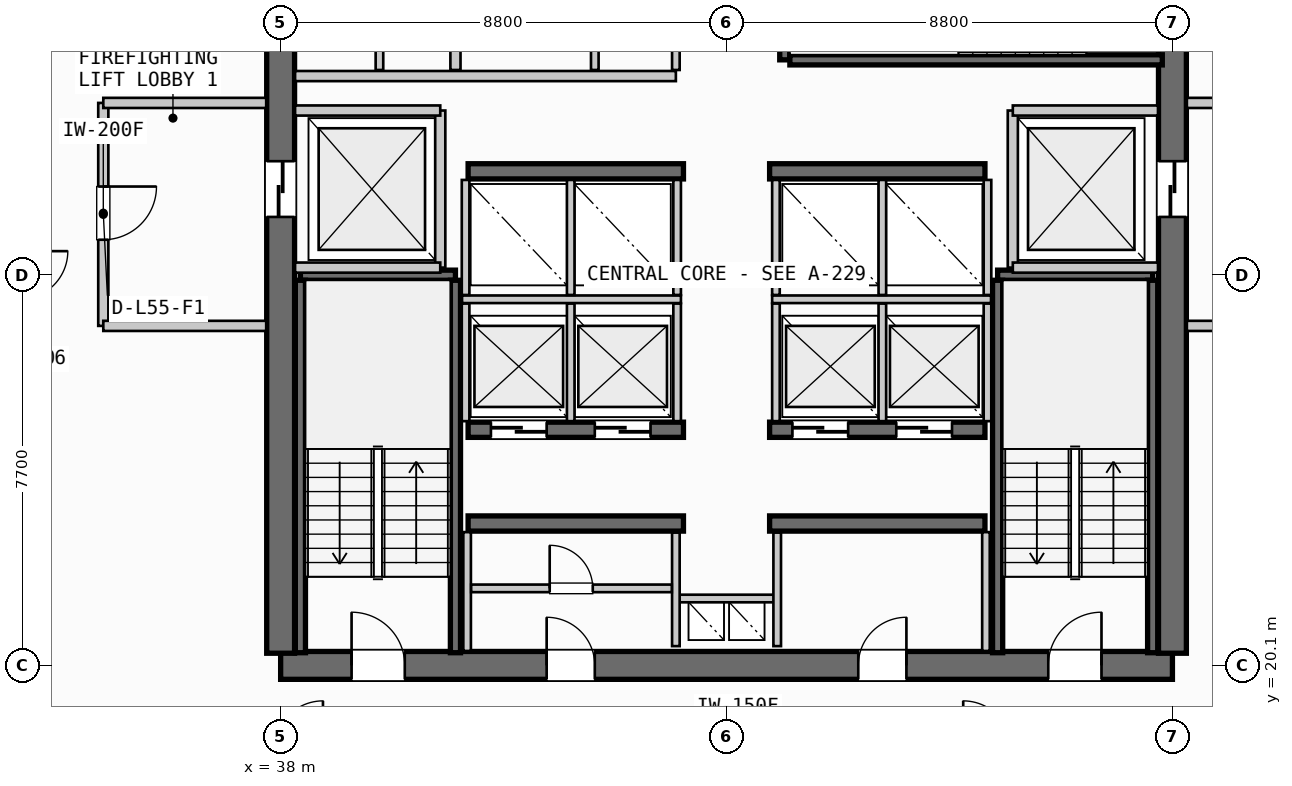
"""IFC4 building model, lengths in metres.
Left out: names, types, materials, properties, quantities, classifications, styles, units other than length and angle.
Written with IfcOpenShell. Run it as: python <this file> out.ifc"""

import sys

from ifc_helpers import new_model, si_unit, direction, frame, frame_2d, origin, place, context, subcontext, project, spatial, rectangle, extrude, source, transform, mapped, element, fill, save


model = new_model("IFC4")
c1 = context("Model", 3, precision=1e-05, world=origin(), true_north=direction((0.0, 1.0)))
c2 = subcontext(c1, "Body", "Model", "MODEL_VIEW")
j1 = project(units=[si_unit("LENGTHUNIT", "METRE"), si_unit("PLANEANGLEUNIT", "RADIAN")], contexts=[c1])
p1 = place(None, origin())
s1 = spatial("IfcSite", under=j1, at=p1, CompositionType="ELEMENT")
p2 = place(p1, origin())
s2 = spatial("IfcBuilding", under=s1, at=p2, CompositionType="ELEMENT")
p3 = place(p2, frame((0.0, 0.0, 211.4)))
s3 = spatial("IfcBuildingStorey", under=s2, at=p3, CompositionType="ELEMENT", Elevation=211.4)
p4 = place(p3, frame((38.0, 20.1, 0.0), z_axis=(0.0, 0.0, 1.0), x_axis=(1.0, 0.0, 0.0)))
e1 = element("IfcWall", 1, at=p4, inside=s3, PredefinedType="SHEAR", context=c2, shape_type="SweptSolid", body=[
    extrude(rectangle(XDim=17.6, YDim=0.55, at=frame_2d((8.8, 0.0))), origin(), (0.0, 0.0, 1.0), 3.26),
])
p5 = place(p4, frame((1.4, 0.0, 0.0)))
e2 = element("IfcOpeningElement", 2, at=p5, cuts=e1, PredefinedType="OPENING", context=c2, shape_type="SweptSolid", body=[
    extrude(rectangle(XDim=1.05, YDim=2.15, at=frame_2d((0.525, 1.075))), frame((0.0, 0.285, 0.0), z_axis=(0.0, -1.0, 0.0), x_axis=(1.0, 0.0, 0.0)), (0.0, 0.0, 1.0), 0.57),
])
p6 = place(p4, frame((15.15, 0.0, 0.0)))
e3 = element("IfcOpeningElement", 3, at=p6, cuts=e1, PredefinedType="OPENING", context=c2, shape_type="SweptSolid", body=[
    extrude(rectangle(XDim=1.05, YDim=2.15, at=frame_2d((0.525, 1.075))), frame((0.0, 0.285, 0.0), z_axis=(0.0, -1.0, 0.0), x_axis=(1.0, 0.0, 0.0)), (0.0, 0.0, 1.0), 0.57),
])
p7 = place(p4, frame((5.25, 0.0, 0.0)))
e4 = element("IfcOpeningElement", 4, at=p7, cuts=e1, PredefinedType="OPENING", context=c2, shape_type="SweptSolid", body=[
    extrude(rectangle(XDim=0.95, YDim=2.15, at=frame_2d((0.475, 1.075))), frame((0.0, 0.285, 0.0), z_axis=(0.0, -1.0, 0.0), x_axis=(1.0, 0.0, 0.0)), (0.0, 0.0, 1.0), 0.57),
])
p8 = place(p4, frame((11.4, 0.0, 0.0)))
e5 = element("IfcOpeningElement", 5, at=p8, cuts=e1, PredefinedType="OPENING", context=c2, shape_type="SweptSolid", body=[
    extrude(rectangle(XDim=0.95, YDim=2.15, at=frame_2d((0.475, 1.075))), frame((0.0, 0.285, 0.0), z_axis=(0.0, -1.0, 0.0), x_axis=(1.0, 0.0, 0.0)), (0.0, 0.0, 1.0), 0.57),
])
p9 = place(p3, frame((38.0, 35.26, 0.0), z_axis=(0.0, 0.0, 1.0), x_axis=(0.0, -1.0, 0.0)))
e6 = element("IfcWall", 6, at=p9, inside=s3, PredefinedType="SHEAR", context=c2, shape_type="SweptSolid", body=[
    extrude(rectangle(XDim=14.92, YDim=0.55, at=frame_2d((7.46, 0.0))), origin(), (0.0, 0.0, 1.0), 3.26),
])
p10 = place(p9, frame((5.21, 0.0, 0.0)))
e7 = element("IfcOpeningElement", 7, at=p10, cuts=e6, PredefinedType="OPENING", context=c2, shape_type="SweptSolid", body=[
    extrude(rectangle(XDim=1.1, YDim=2.2, at=frame_2d((0.55, 1.1))), frame((0.0, 0.285, 0.0), z_axis=(0.0, -1.0, 0.0), x_axis=(1.0, 0.0, 0.0)), (0.0, 0.0, 1.0), 0.57),
])
p11 = place(p3, frame((55.6, 20.34, 0.0), z_axis=(0.0, 0.0, 1.0), x_axis=(0.0, 1.0, 0.0)))
e8 = element("IfcWall", 8, at=p11, inside=s3, PredefinedType="SHEAR", context=c2, shape_type="SweptSolid", body=[
    extrude(rectangle(XDim=14.92, YDim=0.55, at=frame_2d((7.46, 0.0))), origin(), (0.0, 0.0, 1.0), 3.26),
])
p12 = place(p11, frame((12.71, 0.0, 0.0)))
e9 = element("IfcOpeningElement", 9, at=p12, cuts=e8, PredefinedType="OPENING", context=c2, shape_type="SweptSolid", body=[
    extrude(rectangle(XDim=1.05, YDim=2.15, at=frame_2d((0.525, 1.075))), frame((0.0, 0.285, 0.0), z_axis=(0.0, -1.0, 0.0), x_axis=(1.0, 0.0, 0.0)), (0.0, 0.0, 1.0), 0.57),
])
p13 = place(p11, frame((8.61, 0.0, 0.0)))
e10 = element("IfcOpeningElement", 10, at=p13, cuts=e8, PredefinedType="OPENING", context=c2, shape_type="SweptSolid", body=[
    extrude(rectangle(XDim=1.1, YDim=2.2, at=frame_2d((0.55, 1.1))), frame((0.0, 0.285, 0.0), z_axis=(0.0, -1.0, 0.0), x_axis=(1.0, 0.0, 0.0)), (0.0, 0.0, 1.0), 0.57),
])
for number, where, z_axis, x_axis in (
    (11, (41.7, 22.9, 0.0), (0.0, 0.0, 1.0), (1.0, 0.0, 0.0)),
    (12, (47.65, 22.9, 0.0), (0.0, 0.0, 1.0), (1.0, 0.0, 0.0)),
):
    element("IfcWall", number, at=place(p3, frame(where, z_axis=z_axis, x_axis=x_axis)), inside=s3, PredefinedType="SHEAR", context=c2, shape_type="SweptSolid", body=[
        extrude(rectangle(XDim=4.25, YDim=0.3, at=frame_2d((2.125, 0.0))), origin(), (0.0, 0.0, 1.0), 3.26),
    ])
p14 = place(p3, frame((41.7, 24.75, 0.0), z_axis=(0.0, 0.0, 1.0), x_axis=(1.0, 0.0, 0.0)))
e13 = element("IfcWall", 13, at=p14, inside=s3, PredefinedType="SHEAR", context=c2, shape_type="SweptSolid", body=[
    extrude(rectangle(XDim=4.25, YDim=0.3, at=frame_2d((2.125, 0.0))), origin(), (0.0, 0.0, 1.0), 3.26),
])
p15 = place(p14, frame((0.45, 0.0, 0.0)))
e14 = element("IfcOpeningElement", 14, at=p15, cuts=e13, PredefinedType="OPENING", context=c2, shape_type="SweptSolid", body=[
    extrude(rectangle(XDim=1.1, YDim=2.2, at=frame_2d((0.55, 1.1))), frame((0.0, 0.16, 0.0), z_axis=(0.0, -1.0, 0.0), x_axis=(1.0, 0.0, 0.0)), (0.0, 0.0, 1.0), 0.32),
])
p16 = place(p14, frame((2.5, 0.0, 0.0)))
e15 = element("IfcOpeningElement", 15, at=p16, cuts=e13, PredefinedType="OPENING", context=c2, shape_type="SweptSolid", body=[
    extrude(rectangle(XDim=1.1, YDim=2.2, at=frame_2d((0.55, 1.1))), frame((0.0, 0.16, 0.0), z_axis=(0.0, -1.0, 0.0), x_axis=(1.0, 0.0, 0.0)), (0.0, 0.0, 1.0), 0.32),
])
p17 = place(p3, frame((47.65, 24.75, 0.0), z_axis=(0.0, 0.0, 1.0), x_axis=(1.0, 0.0, 0.0)))
e16 = element("IfcWall", 16, at=p17, inside=s3, PredefinedType="SHEAR", context=c2, shape_type="SweptSolid", body=[
    extrude(rectangle(XDim=4.25, YDim=0.3, at=frame_2d((2.125, 0.0))), origin(), (0.0, 0.0, 1.0), 3.26),
])
p18 = place(p17, frame((0.45, 0.0, 0.0)))
e17 = element("IfcOpeningElement", 17, at=p18, cuts=e16, PredefinedType="OPENING", context=c2, shape_type="SweptSolid", body=[
    extrude(rectangle(XDim=1.1, YDim=2.2, at=frame_2d((0.55, 1.1))), frame((0.0, 0.16, 0.0), z_axis=(0.0, -1.0, 0.0), x_axis=(1.0, 0.0, 0.0)), (0.0, 0.0, 1.0), 0.32),
])
p19 = place(p17, frame((2.5, 0.0, 0.0)))
e18 = element("IfcOpeningElement", 18, at=p19, cuts=e16, PredefinedType="OPENING", context=c2, shape_type="SweptSolid", body=[
    extrude(rectangle(XDim=1.1, YDim=2.2, at=frame_2d((0.55, 1.1))), frame((0.0, 0.16, 0.0), z_axis=(0.0, -1.0, 0.0), x_axis=(1.0, 0.0, 0.0)), (0.0, 0.0, 1.0), 0.32),
])
for number, where, z_axis, x_axis in (
    (19, (41.7, 29.85, 0.0), (0.0, 0.0, 1.0), (1.0, 0.0, 0.0)),
    (20, (47.65, 29.85, 0.0), (0.0, 0.0, 1.0), (1.0, 0.0, 0.0)),
):
    element("IfcWall", number, at=place(p3, frame(where, z_axis=z_axis, x_axis=x_axis)), inside=s3, PredefinedType="SHEAR", context=c2, shape_type="SweptSolid", body=[
        extrude(rectangle(XDim=4.25, YDim=0.3, at=frame_2d((2.125, 0.0))), origin(), (0.0, 0.0, 1.0), 3.26),
    ])
p20 = place(p3, frame((38.39, 27.8, 0.0), z_axis=(0.0, 0.0, 1.0), x_axis=(1.0, 0.0, 0.0)))
e21 = element("IfcWall", 21, at=p20, inside=s3, PredefinedType="SHEAR", context=c2, shape_type="SweptSolid", body=[
    extrude(rectangle(XDim=3.06, YDim=0.2, at=frame_2d((1.53, 0.0))), origin(), (0.0, 0.0, 1.0), 3.26),
])
for number, where, z_axis, x_axis in (
    (22, (41.45, 27.7, 0.0), (0.0, 0.0, 1.0), (0.0, -1.0, 0.0)),
    (23, (38.39, 20.35, 0.0), (0.0, 0.0, 1.0), (0.0, 1.0, 0.0)),
):
    element("IfcWall", number, at=place(p3, frame(where, z_axis=z_axis, x_axis=x_axis)), inside=s3, PredefinedType="SHEAR", context=c2, shape_type="SweptSolid", body=[
        extrude(rectangle(XDim=7.35, YDim=0.2, at=frame_2d((3.675, 0.0))), origin(), (0.0, 0.0, 1.0), 3.26),
    ])
p21 = place(p3, frame((52.15, 27.8, 0.0), z_axis=(0.0, 0.0, 1.0), x_axis=(1.0, 0.0, 0.0)))
e24 = element("IfcWall", 24, at=p21, inside=s3, PredefinedType="SHEAR", context=c2, shape_type="SweptSolid", body=[
    extrude(rectangle(XDim=3.06, YDim=0.2, at=frame_2d((1.53, 0.0))), origin(), (0.0, 0.0, 1.0), 3.26),
])
for number, where, z_axis, x_axis in (
    (25, (55.21, 27.7, 0.0), (0.0, 0.0, 1.0), (0.0, -1.0, 0.0)),
    (26, (52.15, 20.35, 0.0), (0.0, 0.0, 1.0), (0.0, 1.0, 0.0)),
):
    element("IfcWall", number, at=place(p3, frame(where, z_axis=z_axis, x_axis=x_axis)), inside=s3, PredefinedType="SHEAR", context=c2, shape_type="SweptSolid", body=[
        extrude(rectangle(XDim=7.35, YDim=0.2, at=frame_2d((3.675, 0.0))), origin(), (0.0, 0.0, 1.0), 3.26),
    ])
p22 = place(p3, frame((47.95, 32.05, 0.0), z_axis=(0.0, 0.0, 1.0), x_axis=(0.0, 1.0, 0.0)))
e27 = element("IfcWall", 27, at=p22, inside=s3, PredefinedType="SHEAR", context=c2, shape_type="SweptSolid", body=[
    extrude(rectangle(XDim=3.06, YDim=0.2, at=frame_2d((1.53, 0.0))), origin(), (0.0, 0.0, 1.0), 3.26),
])
p23 = place(p3, frame((55.4, 32.05, 0.0), z_axis=(0.0, 0.0, 1.0), x_axis=(-1.0, 0.0, 0.0)))
e28 = element("IfcWall", 28, at=p23, inside=s3, PredefinedType="SHEAR", context=c2, shape_type="SweptSolid", body=[
    extrude(rectangle(XDim=7.35, YDim=0.2, at=frame_2d((3.675, 0.0))), origin(), (0.0, 0.0, 1.0), 3.26),
])
p24 = place(p3, frame((45.8, 21.42, 0.0), z_axis=(0.0, 0.0, 1.0), x_axis=(1.0, 0.0, 0.0)))
e29 = element("IfcWall", 29, at=p24, inside=s3, PredefinedType="PARTITIONING", context=c2, shape_type="SweptSolid", body=[
    extrude(rectangle(XDim=2.0, YDim=0.15, at=frame_2d((1.0, 0.0))), origin(), (0.0, 0.0, 1.0), 2.455),
])
for number, where, z_axis, x_axis in (
    (30, (45.8, 20.48, 0.0), (0.0, 0.0, 1.0), (0.0, 1.0, 0.0)),
    (31, (47.8, 20.48, 0.0), (0.0, 0.0, 1.0), (0.0, 1.0, 0.0)),
):
    element("IfcWall", number, at=place(p3, frame(where, z_axis=z_axis, x_axis=x_axis)), inside=s3, PredefinedType="PARTITIONING", context=c2, shape_type="SweptSolid", body=[
        extrude(rectangle(XDim=2.24, YDim=0.15, at=frame_2d((1.12, 0.0))), origin(), (0.0, 0.0, 1.0), 2.455),
    ])
p25 = place(p3, frame((41.15, 27.95, 0.0), z_axis=(0.0, 0.0, 1.0), x_axis=(0.0, 1.0, 0.0)))
e32 = element("IfcWall", 32, at=p25, inside=s3, PredefinedType="PARTITIONING", context=c2, shape_type="SweptSolid", body=[
    extrude(rectangle(XDim=3.1, YDim=0.2, at=frame_2d((1.55, 0.0))), origin(), (0.0, 0.0, 1.0), 2.455),
])
for number, where, z_axis, x_axis in (
    (33, (38.285, 27.95, 0.0), (0.0, 0.0, 1.0), (1.0, 0.0, 0.0)),
    (34, (38.285, 31.05, 0.0), (0.0, 0.0, 1.0), (1.0, 0.0, 0.0)),
):
    element("IfcWall", number, at=place(p3, frame(where, z_axis=z_axis, x_axis=x_axis)), inside=s3, PredefinedType="PARTITIONING", context=c2, shape_type="SweptSolid", body=[
        extrude(rectangle(XDim=2.865, YDim=0.2, at=frame_2d((1.433, 0.0))), origin(), (0.0, 0.0, 1.0), 2.455),
    ])
p26 = place(p3, frame((34.5, 31.2, 0.0), z_axis=(0.0, 0.0, 1.0), x_axis=(0.0, -1.0, 0.0)))
e35 = element("IfcWall", 35, at=p26, inside=s3, PredefinedType="PARTITIONING", context=c2, shape_type="SweptSolid", body=[
    extrude(rectangle(XDim=4.4, YDim=0.2, at=frame_2d((2.2, 0.0))), origin(), (0.0, 0.0, 1.0), 2.455),
])
p27 = place(p26, frame((1.65, 0.0, 0.0)))
e36 = element("IfcOpeningElement", 36, at=p27, cuts=e35, PredefinedType="OPENING", context=c2, shape_type="SweptSolid", body=[
    extrude(rectangle(XDim=1.05, YDim=2.15, at=frame_2d((0.525, 1.075))), frame((0.0, 0.11, 0.0), z_axis=(0.0, -1.0, 0.0), x_axis=(1.0, 0.0, 0.0)), (0.0, 0.0, 1.0), 0.22),
])
for number, where, z_axis, x_axis in (
    (37, (34.5, 26.8, 0.0), (0.0, 0.0, 1.0), (1.0, 0.0, 0.0)),
    (38, (34.5, 31.2, 0.0), (0.0, 0.0, 1.0), (1.0, 0.0, 0.0)),
):
    element("IfcWall", number, at=place(p3, frame(where, z_axis=z_axis, x_axis=x_axis)), inside=s3, PredefinedType="PARTITIONING", context=c2, shape_type="SweptSolid", body=[
        extrude(rectangle(XDim=3.215, YDim=0.2, at=frame_2d((1.607, 0.0))), origin(), (0.0, 0.0, 1.0), 2.455),
    ])
p28 = place(p3, frame((52.45, 27.95, 0.0), z_axis=(0.0, 0.0, 1.0), x_axis=(0.0, 1.0, 0.0)))
e39 = element("IfcWall", 39, at=p28, inside=s3, PredefinedType="PARTITIONING", context=c2, shape_type="SweptSolid", body=[
    extrude(rectangle(XDim=3.1, YDim=0.2, at=frame_2d((1.55, 0.0))), origin(), (0.0, 0.0, 1.0), 2.455),
])
for number, where, z_axis, x_axis in (
    (40, (52.45, 27.95, 0.0), (0.0, 0.0, 1.0), (1.0, 0.0, 0.0)),
    (41, (52.45, 31.05, 0.0), (0.0, 0.0, 1.0), (1.0, 0.0, 0.0)),
):
    element("IfcWall", number, at=place(p3, frame(where, z_axis=z_axis, x_axis=x_axis)), inside=s3, PredefinedType="PARTITIONING", context=c2, shape_type="SweptSolid", body=[
        extrude(rectangle(XDim=2.865, YDim=0.2, at=frame_2d((1.433, 0.0))), origin(), (0.0, 0.0, 1.0), 2.455),
    ])
for number, where, z_axis, x_axis in (
    (42, (55.885, 26.8, 0.0), (0.0, 0.0, 1.0), (1.0, 0.0, 0.0)),
    (43, (55.885, 31.2, 0.0), (0.0, 0.0, 1.0), (1.0, 0.0, 0.0)),
):
    element("IfcWall", number, at=place(p3, frame(where, z_axis=z_axis, x_axis=x_axis)), inside=s3, PredefinedType="PARTITIONING", context=c2, shape_type="SweptSolid", body=[
        extrude(rectangle(XDim=3.215, YDim=0.2, at=frame_2d((1.607, 0.0))), origin(), (0.0, 0.0, 1.0), 2.455),
    ])
for number, where, z_axis, x_axis in (
    (44, (41.68, 20.385, 0.0), (0.0, 0.0, 1.0), (0.0, 1.0, 0.0)),
    (45, (51.92, 20.385, 0.0), (0.0, 0.0, 1.0), (0.0, 1.0, 0.0)),
):
    element("IfcWall", number, at=place(p3, frame(where, z_axis=z_axis, x_axis=x_axis)), inside=s3, PredefinedType="PARTITIONING", context=c2, shape_type="SweptSolid", body=[
        extrude(rectangle(XDim=2.345, YDim=0.15, at=frame_2d((1.172, 0.0))), origin(), (0.0, 0.0, 1.0), 2.455),
    ])
p29 = place(p3, frame((41.76, 21.62, 0.0), z_axis=(0.0, 0.0, 1.0), x_axis=(1.0, 0.0, 0.0)))
e46 = element("IfcWall", 46, at=p29, inside=s3, PredefinedType="PARTITIONING", context=c2, shape_type="SweptSolid", body=[
    extrude(rectangle(XDim=3.96, YDim=0.15, at=frame_2d((1.98, 0.0))), origin(), (0.0, 0.0, 1.0), 2.455),
])
p30 = place(p29, frame((1.55, 0.0, 0.0)))
e47 = element("IfcOpeningElement", 47, at=p30, cuts=e46, PredefinedType="OPENING", context=c2, shape_type="SweptSolid", body=[
    extrude(rectangle(XDim=0.85, YDim=2.15, at=frame_2d((0.425, 1.075))), frame((0.0, 0.085, 0.0), z_axis=(0.0, -1.0, 0.0), x_axis=(1.0, 0.0, 0.0)), (0.0, 0.0, 1.0), 0.17),
])
p31 = place(p3, frame((41.58, 27.325, 0.0), z_axis=(0.0, 0.0, 1.0), x_axis=(1.0, 0.0, 0.0)))
e48 = element("IfcWall", 48, at=p31, inside=s3, PredefinedType="PARTITIONING", context=c2, shape_type="SweptSolid", body=[
    extrude(rectangle(XDim=4.32, YDim=0.15, at=frame_2d((2.16, 0.0))), origin(), (0.0, 0.0, 1.0), 2.455),
])
p32 = place(p3, frame((47.7, 27.325, 0.0), z_axis=(0.0, 0.0, 1.0), x_axis=(1.0, 0.0, 0.0)))
e49 = element("IfcWall", 49, at=p32, inside=s3, PredefinedType="PARTITIONING", context=c2, shape_type="SweptSolid", body=[
    extrude(rectangle(XDim=4.32, YDim=0.15, at=frame_2d((2.16, 0.0))), origin(), (0.0, 0.0, 1.0), 2.455),
])
for number, where, z_axis, x_axis in (
    (50, (41.65, 24.92, 0.0), (0.0, 0.0, 1.0), (0.0, 1.0, 0.0)),
    (51, (43.725, 24.92, 0.0), (0.0, 0.0, 1.0), (0.0, 1.0, 0.0)),
    (52, (45.825, 24.92, 0.0), (0.0, 0.0, 1.0), (0.0, 1.0, 0.0)),
    (53, (47.775, 24.92, 0.0), (0.0, 0.0, 1.0), (0.0, 1.0, 0.0)),
    (54, (49.875, 24.92, 0.0), (0.0, 0.0, 1.0), (0.0, 1.0, 0.0)),
    (55, (51.95, 24.92, 0.0), (0.0, 0.0, 1.0), (0.0, 1.0, 0.0)),
):
    element("IfcWall", number, at=place(p3, frame(where, z_axis=z_axis, x_axis=x_axis)), inside=s3, PredefinedType="PARTITIONING", context=c2, shape_type="SweptSolid", body=[
        extrude(rectangle(XDim=2.32, YDim=0.15, at=frame_2d((1.16, 0.0))), origin(), (0.0, 0.0, 1.0), 2.455),
    ])
for number, where, z_axis, x_axis in (
    (56, (41.65, 27.41, 0.0), (0.0, 0.0, 1.0), (0.0, 1.0, 0.0)),
    (57, (43.725, 27.41, 0.0), (0.0, 0.0, 1.0), (0.0, 1.0, 0.0)),
    (58, (45.825, 27.41, 0.0), (0.0, 0.0, 1.0), (0.0, 1.0, 0.0)),
    (59, (47.775, 27.41, 0.0), (0.0, 0.0, 1.0), (0.0, 1.0, 0.0)),
    (60, (49.875, 27.41, 0.0), (0.0, 0.0, 1.0), (0.0, 1.0, 0.0)),
    (61, (51.95, 27.41, 0.0), (0.0, 0.0, 1.0), (0.0, 1.0, 0.0)),
):
    element("IfcWall", number, at=place(p3, frame(where, z_axis=z_axis, x_axis=x_axis)), inside=s3, PredefinedType="PARTITIONING", context=c2, shape_type="SweptSolid", body=[
        extrude(rectangle(XDim=2.27, YDim=0.15, at=frame_2d((1.135, 0.0))), origin(), (0.0, 0.0, 1.0), 2.455),
    ])
p33 = place(p3, frame((41.45, 31.85, 0.0), z_axis=(0.0, 0.0, 1.0), x_axis=(0.0, 1.0, 0.0)))
e62 = element("IfcWall", 62, at=p33, inside=s3, PredefinedType="PARTITIONING", context=c2, shape_type="SweptSolid", body=[
    extrude(rectangle(XDim=3.365, YDim=0.2, at=frame_2d((1.683, 0.0))), origin(), (0.0, 0.0, 1.0), 2.455),
])
p34 = place(p3, frame((38.285, 31.73, 0.0), z_axis=(0.0, 0.0, 1.0), x_axis=(1.0, 0.0, 0.0)))
e63 = element("IfcWall", 63, at=p34, inside=s3, PredefinedType="PARTITIONING", context=c2, shape_type="SweptSolid", body=[
    extrude(rectangle(XDim=7.515, YDim=0.2, at=frame_2d((3.758, 0.0))), origin(), (0.0, 0.0, 1.0), 2.455),
])
for number, where, z_axis, x_axis in (
    (64, (45.8, 31.85, 0.0), (0.0, 0.0, 1.0), (0.0, 1.0, 0.0)),
    (65, (39.95, 31.85, 0.0), (0.0, 0.0, 1.0), (0.0, 1.0, 0.0)),
):
    element("IfcWall", number, at=place(p3, frame(where, z_axis=z_axis, x_axis=x_axis)), inside=s3, PredefinedType="PARTITIONING", context=c2, shape_type="SweptSolid", body=[
        extrude(rectangle(XDim=3.365, YDim=0.15, at=frame_2d((1.683, 0.0))), origin(), (0.0, 0.0, 1.0), 2.455),
    ])
p35 = place(p3, frame((44.2, 31.85, 0.0), z_axis=(0.0, 0.0, 1.0), x_axis=(0.0, 1.0, 0.0)))
e66 = element("IfcWall", 66, at=p35, inside=s3, PredefinedType="PLUMBINGWALL", context=c2, shape_type="SweptSolid", body=[
    extrude(rectangle(XDim=3.365, YDim=0.15, at=frame_2d((1.683, 0.0))), origin(), (0.0, 0.0, 1.0), 2.455),
])
m1 = source(origin(), c2, "Body", "SweptSolid", [
    extrude(rectangle(XDim=1.05, YDim=2.15, at=frame_2d((0.525, 1.075))), frame((0.0, 0.025, 0.0), z_axis=(0.0, -1.0, 0.0), x_axis=(1.0, 0.0, 0.0)), (0.0, 0.0, 1.0), 0.05),
])
p36 = place(p5, origin())
e67 = element("IfcDoor", 67, at=p36, inside=s3, OperationType="SINGLE_SWING_LEFT", PredefinedType="DOOR", context=c2, shape_type="MappedRepresentation", body=[
    mapped(m1, transform((0.0, 0.0, 0.0), scale=1.0)),
])
fill(e2, e67)
p37 = place(p6, origin())
e68 = element("IfcDoor", 68, at=p37, inside=s3, OperationType="SINGLE_SWING_RIGHT", PredefinedType="DOOR", context=c2, shape_type="MappedRepresentation", body=[
    mapped(m1, transform((0.0, 0.0, 0.0), scale=1.0)),
])
fill(e3, e68)
m2 = source(origin(), c2, "Body", "SweptSolid", [
    extrude(rectangle(XDim=1.1, YDim=2.2, at=frame_2d((0.55, 1.1))), frame((0.0, 0.025, 0.0), z_axis=(0.0, -1.0, 0.0), x_axis=(1.0, 0.0, 0.0)), (0.0, 0.0, 1.0), 0.05),
])
p38 = place(p10, origin())
e69 = element("IfcDoor", 69, at=p38, inside=s3, OperationType="SLIDING_TO_LEFT", PredefinedType="DOOR", context=c2, shape_type="MappedRepresentation", body=[
    mapped(m2, transform((0.0, 0.0, 0.0), scale=1.0)),
])
fill(e7, e69)
p39 = place(p13, origin())
e70 = element("IfcDoor", 70, at=p39, inside=s3, OperationType="SLIDING_TO_RIGHT", PredefinedType="DOOR", context=c2, shape_type="MappedRepresentation", body=[
    mapped(m2, transform((0.0, 0.0, 0.0), scale=1.0)),
])
fill(e10, e70)
m3 = source(origin(), c2, "Body", "SweptSolid", [
    extrude(rectangle(XDim=0.95, YDim=2.15, at=frame_2d((0.475, 1.075))), frame((0.0, 0.025, 0.0), z_axis=(0.0, -1.0, 0.0), x_axis=(1.0, 0.0, 0.0)), (0.0, 0.0, 1.0), 0.05),
])
p40 = place(p7, origin())
e71 = element("IfcDoor", 71, at=p40, inside=s3, OperationType="SINGLE_SWING_LEFT", PredefinedType="DOOR", context=c2, shape_type="MappedRepresentation", body=[
    mapped(m3, transform((0.0, 0.0, 0.0), scale=1.0)),
])
fill(e4, e71)
p41 = place(p8, origin())
e72 = element("IfcDoor", 72, at=p41, inside=s3, OperationType="SINGLE_SWING_RIGHT", PredefinedType="DOOR", context=c2, shape_type="MappedRepresentation", body=[
    mapped(m3, transform((0.0, 0.0, 0.0), scale=1.0)),
])
fill(e5, e72)
p42 = place(p15, origin())
e73 = element("IfcDoor", 73, at=p42, inside=s3, OperationType="SLIDING_TO_RIGHT", PredefinedType="DOOR", context=c2, shape_type="MappedRepresentation", body=[
    mapped(m2, transform((0.0, 0.0, 0.0), scale=1.0)),
])
fill(e14, e73)
p43 = place(p16, origin())
e74 = element("IfcDoor", 74, at=p43, inside=s3, OperationType="SLIDING_TO_RIGHT", PredefinedType="DOOR", context=c2, shape_type="MappedRepresentation", body=[
    mapped(m2, transform((0.0, 0.0, 0.0), scale=1.0)),
])
fill(e15, e74)
p44 = place(p18, origin())
e75 = element("IfcDoor", 75, at=p44, inside=s3, OperationType="SLIDING_TO_RIGHT", PredefinedType="DOOR", context=c2, shape_type="MappedRepresentation", body=[
    mapped(m2, transform((0.0, 0.0, 0.0), scale=1.0)),
])
fill(e17, e75)
p45 = place(p19, origin())
e76 = element("IfcDoor", 76, at=p45, inside=s3, OperationType="SLIDING_TO_RIGHT", PredefinedType="DOOR", context=c2, shape_type="MappedRepresentation", body=[
    mapped(m2, transform((0.0, 0.0, 0.0), scale=1.0)),
])
fill(e18, e76)
p46 = place(p27, origin())
e77 = element("IfcDoor", 77, at=p46, inside=s3, OperationType="SINGLE_SWING_LEFT", PredefinedType="DOOR", context=c2, shape_type="MappedRepresentation", body=[
    mapped(m1, transform((0.0, 0.0, 0.0), scale=1.0)),
])
fill(e36, e77)
m4 = source(origin(), c2, "Body", "SweptSolid", [
    extrude(rectangle(XDim=0.85, YDim=2.15, at=frame_2d((0.425, 1.075))), frame((0.0, 0.025, 0.0), z_axis=(0.0, -1.0, 0.0), x_axis=(1.0, 0.0, 0.0)), (0.0, 0.0, 1.0), 0.05),
])
p47 = place(p30, origin())
e78 = element("IfcDoor", 78, at=p47, inside=s3, OperationType="SINGLE_SWING_LEFT", PredefinedType="DOOR", context=c2, shape_type="MappedRepresentation", body=[
    mapped(m4, transform((0.0, 0.0, 0.0), scale=1.0)),
])
fill(e47, e78)
save(model, sys.argv[1])
